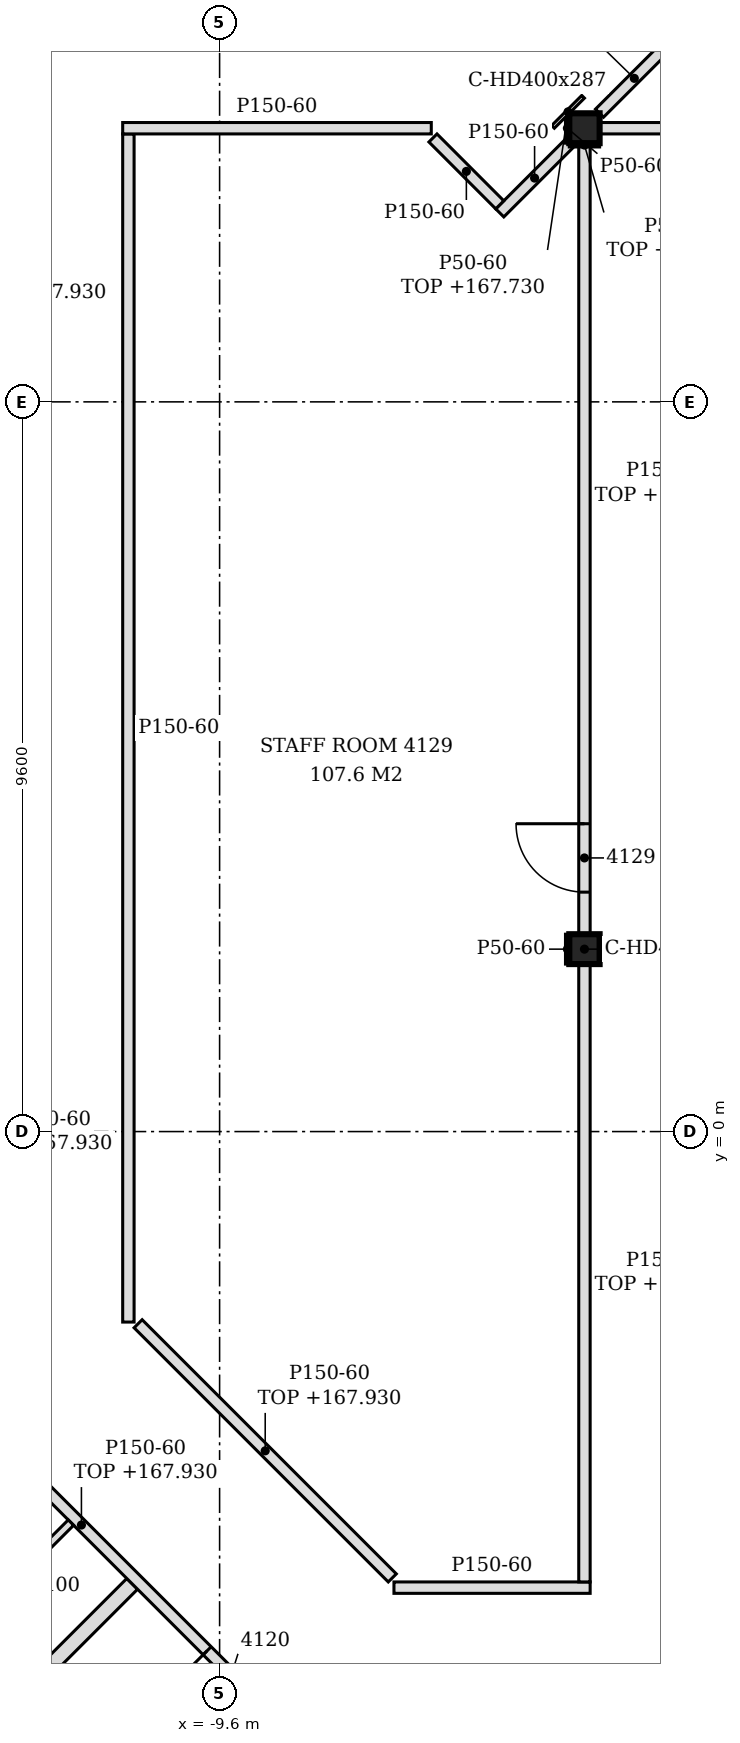
"""IFC4 building model, lengths in metres.
Left out: names, types, materials, properties, quantities, classifications, styles, units other than length and angle.
Written with IfcOpenShell. Run it as: python <this file> out.ifc"""

import sys

from ifc_helpers import new_model, si_unit, direction, frame, frame_2d, origin, origin_2d, place, context, subcontext, project, spatial, polyline, rectangle, i_section, outline, extrude, element, fill, save


model = new_model("IFC4")
c1 = context("Model", 3, precision=1e-05, world=origin(), true_north=direction((0.0, 1.0)))
c2 = subcontext(c1, "Body", "Model", "MODEL_VIEW")
j1 = project(units=[si_unit("LENGTHUNIT", "METRE"), si_unit("PLANEANGLEUNIT", "RADIAN")], contexts=[c1])
p1 = place(None, origin())
s1 = spatial("IfcSite", under=j1, at=p1, CompositionType="ELEMENT")
p2 = place(p1, origin())
s2 = spatial("IfcBuilding", under=s1, at=p2, CompositionType="ELEMENT")
p3 = place(p2, frame((0.0, 0.0, 165.0)))
s3 = spatial("IfcBuildingStorey", under=s2, at=p3, CompositionType="ELEMENT", Elevation=165.0)
for number, where, z_axis, x_axis in (
    (1, (-4.8, 2.4, -0.15), (0.0, 0.0, 1.0), (1.0, 0.0, 0.0)),
    (2, (-4.8, 13.2, -0.15), (0.0, 0.0, 1.0), (1.0, 0.0, 0.0)),
):
    element("IfcColumn", number, at=place(p3, frame(where, z_axis=z_axis, x_axis=x_axis)), inside=s3, PredefinedType="COLUMN", context=c2, shape_type="SweptSolid", body=[
        extrude(i_section(OverallWidth=0.399, OverallDepth=0.393, WebThickness=0.023, FlangeThickness=0.037, FilletRadius=0.015, at=origin_2d()), origin(), (0.0, 0.0, 1.0), 3.6),
    ])
p4 = place(p3, frame((-14.202, -9.402, 0.0), z_axis=(0.0, 0.0, 1.0), x_axis=(0.707081776084, 0.707131785404, 0.0)))
e3 = element("IfcWall", 3, at=p4, inside=s3, PredefinedType="PARTITIONING", context=c2, shape_type="SweptSolid", body=[
    extrude(rectangle(XDim=4.882, YDim=0.2, at=frame_2d((2.441, 0.0))), origin(), (0.0, 0.0, 1.0), 2.93),
])
p5 = place(p3, frame((-8.322, -8.272, 0.0), z_axis=(0.0, 0.0, 1.0), x_axis=(-0.707106781187, 0.707106781187, 0.0)))
e4 = element("IfcWall", 4, at=p5, inside=s3, PredefinedType="PARTITIONING", context=c2, shape_type="SweptSolid", body=[
    extrude(rectangle(XDim=6.718, YDim=0.15, at=frame_2d((3.359, 0.0))), origin(), (0.0, 0.0, 1.0), 2.93),
])
p6 = place(p5, frame((1.139, 0.0, 0.0)))
e5 = element("IfcOpeningElement", 5, at=p6, cuts=e4, PredefinedType="OPENING", context=c2, shape_type="SweptSolid", body=[
    extrude(rectangle(XDim=0.9, YDim=2.1, at=frame_2d((0.45, 1.05))), frame((0.0, 0.085, 0.0), z_axis=(0.0, -1.0, 0.0), x_axis=(1.0, 0.0, 0.0)), (0.0, 0.0, 1.0), 0.17),
])
p7 = place(p3, frame((-13.235, -6.823, 0.0), z_axis=(0.0, 0.0, 1.0), x_axis=(0.707106781187, 0.707106781187, 0.0)))
e6 = element("IfcWall", 6, at=p7, inside=s3, PredefinedType="PARTITIONING", context=c2, shape_type="SweptSolid", body=[
    extrude(rectangle(XDim=2.375, YDim=0.1, at=frame_2d((1.188, 0.0))), origin(), (0.0, 0.0, 1.0), 3.45),
])
p8 = place(p3, frame((-7.306, -6.0, 0.0), z_axis=(0.0, 0.0, 1.0), x_axis=(1.0, 0.0, 0.0)))
e7 = element("IfcWall", 7, at=p8, inside=s3, PredefinedType="PARTITIONING", context=c2, shape_type="SweptSolid", body=[
    extrude(outline(polyline([(0.0, 0.0), (2.581, 0.0), (2.581, 2.83), (2.356, 2.83), (2.354, 3.45), (0.0, 3.45), (0.0, 0.0)])), frame((0.0, 0.075, 0.0), z_axis=(0.0, -1.0, 0.0), x_axis=(1.0, 0.0, 0.0)), (0.0, 0.0, 1.0), 0.15),
])
p9 = place(p3, frame((-7.328, -5.872, 0.0), z_axis=(0.0, 0.0, 1.0), x_axis=(-0.707106781187, 0.707106781187, 0.0)))
e8 = element("IfcWall", 8, at=p9, inside=s3, PredefinedType="PARTITIONING", context=c2, shape_type="SweptSolid", body=[
    extrude(rectangle(XDim=4.729, YDim=0.15, at=frame_2d((2.365, 0.0))), origin(), (0.0, 0.0, 1.0), 2.93),
])
p10 = place(p3, frame((-4.8, -5.925, 0.0), z_axis=(0.0, 0.0, 1.0), x_axis=(0.0, 1.0, 0.0)))
e9 = element("IfcWall", 9, at=p10, inside=s3, PredefinedType="PARTITIONING", context=c2, shape_type="SweptSolid", body=[
    extrude(rectangle(XDim=8.129, YDim=0.15, at=frame_2d((4.064, 0.0))), origin(), (0.0, 0.0, 1.0), 2.83),
])
p11 = place(p3, frame((-10.8, -2.506, 0.0), z_axis=(0.0, 0.0, 1.0), x_axis=(0.0, 1.0, 0.0)))
e10 = element("IfcWall", 10, at=p11, inside=s3, PredefinedType="PARTITIONING", context=c2, shape_type="SweptSolid", body=[
    extrude(outline(polyline([(0.0, 0.0), (15.631, 0.0), (15.631, 3.45), (12.206, 3.45), (12.204, 2.93), (12.006, 2.93), (12.004, 3.45), (7.406, 3.45), (7.404, 2.93), (7.206, 2.93), (7.204, 3.45), (2.606, 3.45), (2.604, 2.93), (2.406, 2.93), (2.404, 3.45), (0.0, 3.45), (0.0, 0.0)])), frame((0.0, 0.075, 0.0), z_axis=(0.0, -1.0, 0.0), x_axis=(1.0, 0.0, 0.0)), (0.0, 0.0, 1.0), 0.15),
])
p12 = place(p3, frame((-4.8, 2.596, 0.0), z_axis=(0.0, 0.0, 1.0), x_axis=(0.0, 1.0, 0.0)))
e11 = element("IfcWall", 11, at=p12, inside=s3, PredefinedType="PARTITIONING", context=c2, shape_type="SweptSolid", body=[
    extrude(rectangle(XDim=10.407, YDim=0.15, at=frame_2d((5.204, 0.0))), origin(), (0.0, 0.0, 1.0), 2.83),
])
p13 = place(p12, frame((0.553, 0.0, 0.0)))
e12 = element("IfcOpeningElement", 12, at=p13, cuts=e11, PredefinedType="OPENING", context=c2, shape_type="SweptSolid", body=[
    extrude(rectangle(XDim=0.9, YDim=2.1, at=frame_2d((0.45, 1.05))), frame((0.0, 0.085, 0.0), z_axis=(0.0, -1.0, 0.0), x_axis=(1.0, 0.0, 0.0)), (0.0, 0.0, 1.0), 0.17),
])
p14 = place(p3, frame((-5.914, 12.086, 0.0), z_axis=(0.0, 0.0, 1.0), x_axis=(0.707106781187, 0.707106781187, 0.0)))
e13 = element("IfcWall", 13, at=p14, inside=s3, PredefinedType="PARTITIONING", context=c2, shape_type="SweptSolid", body=[
    extrude(rectangle(XDim=1.295, YDim=0.15, at=frame_2d((0.648, 0.0))), origin(), (0.0, 0.0, 1.0), 3.45),
])
p15 = place(p3, frame((-5.914, 12.192, 0.0), z_axis=(0.0, 0.0, 1.0), x_axis=(-0.706812296552, 0.70740114323, 0.0)))
e14 = element("IfcWall", 14, at=p15, inside=s3, PredefinedType="PARTITIONING", context=c2, shape_type="SweptSolid", body=[
    extrude(rectangle(XDim=1.244, YDim=0.15, at=frame_2d((0.622, 0.0))), origin(), (0.0, 0.0, 1.0), 3.45),
])
p16 = place(p3, frame((-10.875, 13.2, 0.0), z_axis=(0.0, 0.0, 1.0), x_axis=(1.0, 0.0, 0.0)))
e15 = element("IfcWall", 15, at=p16, inside=s3, PredefinedType="PARTITIONING", context=c2, shape_type="SweptSolid", body=[
    extrude(rectangle(XDim=4.06, YDim=0.15, at=frame_2d((2.03, 0.0))), origin(), (0.0, 0.0, 1.0), 3.45),
])
p17 = place(p3, frame((-4.601, 13.2, 0.0), z_axis=(0.0, 0.0, 1.0), x_axis=(1.0, 0.0, 0.0)))
e16 = element("IfcWall", 16, at=p17, inside=s3, PredefinedType="PARTITIONING", context=c2, shape_type="SweptSolid", body=[
    extrude(rectangle(XDim=4.676, YDim=0.15, at=frame_2d((2.338, 0.0))), origin(), (0.0, 0.0, 1.0), 2.83),
])
p18 = place(p17, frame((1.75, 0.0, 0.0)))
e17 = element("IfcOpeningElement", 17, at=p18, cuts=e16, PredefinedType="OPENING", context=c2, shape_type="SweptSolid", body=[
    extrude(rectangle(XDim=0.9, YDim=2.1, at=frame_2d((0.45, 1.05))), frame((0.0, 0.085, 0.0), z_axis=(0.0, -1.0, 0.0), x_axis=(1.0, 0.0, 0.0)), (0.0, 0.0, 1.0), 0.17),
])
p19 = place(p3, frame((-4.602, 13.398, 0.0), z_axis=(0.0, 0.0, 1.0), x_axis=(0.707106781187, 0.707106781187, 0.0)))
e18 = element("IfcWall", 18, at=p19, inside=s3, PredefinedType="PARTITIONING", context=c2, shape_type="SweptSolid", body=[
    extrude(rectangle(XDim=1.296, YDim=0.15, at=frame_2d((0.648, 0.0))), origin(), (0.0, 0.0, 1.0), 3.45),
])
p20 = place(p3, frame((-13.275, 14.24, 0.0), z_axis=(0.0, 0.0, 1.0), x_axis=(0.707286821097, 0.706926695424, 0.0)))
e19 = element("IfcWall", 19, at=p20, inside=s3, PredefinedType="PARTITIONING", context=c2, shape_type="SweptSolid", body=[
    extrude(rectangle(XDim=2.712, YDim=0.15, at=frame_2d((1.356, 0.0))), origin(), (0.0, 0.0, 1.0), 2.93),
])
p21 = place(p3, frame((-5.024, 2.204, 0.0), z_axis=(0.0, 0.0, 1.0), x_axis=(0.0, 1.0, 0.0)))
e20 = element("IfcWall", 20, at=p21, inside=s3, PredefinedType="PARTITIONING", context=c2, shape_type="SweptSolid", body=[
    extrude(rectangle(XDim=0.393, YDim=0.05, at=frame_2d((0.196, 0.0))), origin(), (0.0, 0.0, 1.0), 3.45),
])
p22 = place(p3, frame((-5.024, 13.003, 0.0), z_axis=(0.0, 0.0, 1.0), x_axis=(0.0, 1.0, 0.0)))
e21 = element("IfcWall", 21, at=p22, inside=s3, PredefinedType="PARTITIONING", context=c2, shape_type="SweptSolid", body=[
    extrude(rectangle(XDim=0.393, YDim=0.05, at=frame_2d((0.197, 0.0))), origin(), (0.0, 0.0, 1.0), 3.45),
])
p23 = place(p3, frame((-5.214, 13.218, 0.0), z_axis=(0.0, 0.0, 1.0), x_axis=(0.707106781187, 0.707106781187, 0.0)))
e22 = element("IfcWall", 22, at=p23, inside=s3, PredefinedType="PARTITIONING", context=c2, shape_type="SweptSolid", body=[
    extrude(rectangle(XDim=0.56, YDim=0.05, at=frame_2d((0.28, 0.0))), origin(), (0.0, 0.0, 1.0), 2.73),
])
p24 = place(p3, frame((-5.0, 12.979, 0.0), z_axis=(0.0, 0.0, 1.0), x_axis=(1.0, 0.0, 0.0)))
e23 = element("IfcWall", 23, at=p24, inside=s3, PredefinedType="PARTITIONING", context=c2, shape_type="SweptSolid", body=[
    extrude(rectangle(XDim=0.399, YDim=0.05, at=frame_2d((0.199, 0.0))), origin(), (0.0, 0.0, 1.0), 2.83),
])
p25 = place(p6, origin())
e24 = element("IfcDoor", 24, at=p25, inside=s3, OperationType="SINGLE_SWING_RIGHT", PredefinedType="DOOR", context=c2, shape_type="SweptSolid", body=[
    extrude(rectangle(XDim=0.9, YDim=2.1, at=frame_2d((0.45, 1.05))), frame((0.0, 0.025, 0.0), z_axis=(0.0, -1.0, 0.0), x_axis=(1.0, 0.0, 0.0)), (0.0, 0.0, 1.0), 0.05),
])
fill(e5, e24)
p26 = place(p13, origin())
e25 = element("IfcDoor", 25, at=p26, inside=s3, OperationType="SINGLE_SWING_RIGHT", PredefinedType="DOOR", context=c2, shape_type="SweptSolid", body=[
    extrude(rectangle(XDim=0.9, YDim=2.1, at=frame_2d((0.45, 1.05))), frame((0.0, 0.025, 0.0), z_axis=(0.0, -1.0, 0.0), x_axis=(1.0, 0.0, 0.0)), (0.0, 0.0, 1.0), 0.05),
])
fill(e12, e25)
save(model, sys.argv[1])
